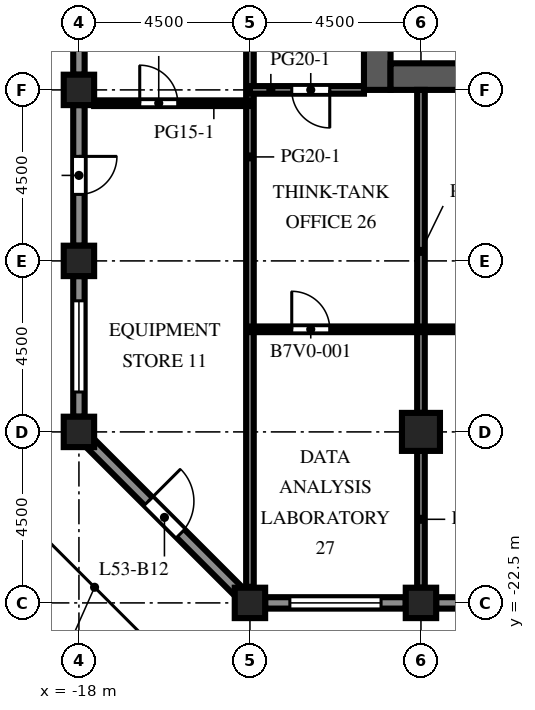
"""IFC4 building model, lengths in metres.
Left out: names, types, materials, properties, quantities, classifications, styles, units other than length and angle.
Written with IfcOpenShell. Run it as: python <this file> out.ifc"""

import sys

from ifc_helpers import new_model, si_unit, direction, frame, frame_2d, origin, origin_2d, place, context, subcontext, project, spatial, rectangle, extrude, element, fill, save


model = new_model("IFC4")
c1 = context("Model", 3, precision=1e-05, world=origin(), true_north=direction((0.0, 1.0)))
c2 = subcontext(c1, "Body", "Model", "MODEL_VIEW")
j1 = project(units=[si_unit("LENGTHUNIT", "METRE"), si_unit("PLANEANGLEUNIT", "RADIAN")], contexts=[c1])
p1 = place(None, origin())
s1 = spatial("IfcSite", under=j1, at=p1, CompositionType="ELEMENT")
p2 = place(p1, origin())
s2 = spatial("IfcBuilding", under=s1, at=p2, CompositionType="ELEMENT")
p3 = place(p2, frame((0.0, 0.0, 235.7)))
s3 = spatial("IfcBuildingStorey", under=s2, at=p3, CompositionType="ELEMENT", Elevation=235.7)
for number, where, z_axis, x_axis in (
    (1, (-18.0, -18.0, 0.0), (0.0, 0.0, 1.0), (1.0, 0.0, 0.0)),
    (2, (-18.0, -13.5, 0.0), (0.0, 0.0, 1.0), (1.0, 0.0, 0.0)),
    (3, (-18.0, -9.0, 0.0), (0.0, 0.0, 1.0), (1.0, 0.0, 0.0)),
    (4, (-13.5, -22.5, 0.0), (0.0, 0.0, 1.0), (1.0, 0.0, 0.0)),
    (5, (-9.0, -22.5, 0.0), (0.0, 0.0, 1.0), (1.0, 0.0, 0.0)),
):
    element("IfcColumn", number, at=place(p3, frame(where, z_axis=z_axis, x_axis=x_axis)), inside=s3, PredefinedType="COLUMN", context=c2, shape_type="SweptSolid", body=[
        extrude(rectangle(XDim=0.8, YDim=0.8, at=origin_2d()), origin(), (0.0, 0.0, 1.0), 4.1),
    ])
p4 = place(p3, frame((-9.0, -18.0, 0.0), z_axis=(0.0, 0.0, 1.0), x_axis=(1.0, 0.0, 0.0)))
e6 = element("IfcColumn", 6, at=p4, inside=s3, PredefinedType="COLUMN", context=c2, shape_type="SweptSolid", body=[
    extrude(rectangle(XDim=1.0, YDim=1.0, at=origin_2d()), origin(), (0.0, 0.0, 1.0), 4.1),
])
p5 = place(p3, frame((-10.15, -9.0, 0.0), z_axis=(0.0, 0.0, 1.0), x_axis=(0.0, 1.0, 0.0)))
e7 = element("IfcWall", 7, at=p5, inside=s3, PredefinedType="SHEAR", context=c2, shape_type="SweptSolid", body=[
    extrude(rectangle(XDim=27.5, YDim=0.7, at=frame_2d((13.75, 0.0))), origin(), (0.0, 0.0, 1.0), 4.1),
])
p6 = place(p5, frame((12.55, 0.0, 0.0)))
e8 = element("IfcOpeningElement", 8, at=p6, cuts=e7, PredefinedType="OPENING", context=c2, shape_type="SweptSolid", body=[
    extrude(rectangle(XDim=2.4, YDim=2.4, at=frame_2d((1.2, 1.2))), frame((0.0, 0.36, 0.0), z_axis=(0.0, -1.0, 0.0), x_axis=(1.0, 0.0, 0.0)), (0.0, 0.0, 1.0), 0.72),
])
p7 = place(p5, frame((6.825, 0.0, 0.0)))
e9 = element("IfcOpeningElement", 9, at=p7, cuts=e7, PredefinedType="OPENING", context=c2, shape_type="SweptSolid", body=[
    extrude(rectangle(XDim=1.2, YDim=2.1, at=frame_2d((0.6, 1.05))), frame((0.0, 0.36, 0.0), z_axis=(0.0, -1.0, 0.0), x_axis=(1.0, 0.0, 0.0)), (0.0, 0.0, 1.0), 0.72),
])
p8 = place(p5, frame((19.475, 0.0, 0.0)))
e10 = element("IfcOpeningElement", 10, at=p8, cuts=e7, PredefinedType="OPENING", context=c2, shape_type="SweptSolid", body=[
    extrude(rectangle(XDim=1.2, YDim=2.1, at=frame_2d((0.6, 1.05))), frame((0.0, 0.36, 0.0), z_axis=(0.0, -1.0, 0.0), x_axis=(1.0, 0.0, 0.0)), (0.0, 0.0, 1.0), 0.72),
])
p9 = place(p3, frame((-9.8, -8.65, 0.0), z_axis=(0.0, 0.0, 1.0), x_axis=(1.0, 0.0, 0.0)))
e11 = element("IfcWall", 11, at=p9, inside=s3, PredefinedType="SHEAR", context=c2, shape_type="SweptSolid", body=[
    extrude(rectangle(XDim=10.6, YDim=0.7, at=frame_2d((5.3, 0.0))), origin(), (0.0, 0.0, 1.0), 4.1),
])
p10 = place(p3, frame((-9.4, -22.5, 0.0), z_axis=(0.0, 0.0, 1.0), x_axis=(-1.0, 0.0, 0.0)))
e12 = element("IfcWall", 12, at=p10, inside=s3, PredefinedType="SOLIDWALL", context=c2, shape_type="SweptSolid", body=[
    extrude(rectangle(XDim=3.7, YDim=0.3, at=frame_2d((1.85, 0.0))), origin(), (0.0, 0.0, 1.0), 2.85),
])
p11 = place(p10, frame((0.65, 0.0, 0.8)))
e13 = element("IfcOpeningElement", 13, at=p11, cuts=e12, PredefinedType="OPENING", context=c2, shape_type="SweptSolid", body=[
    extrude(rectangle(XDim=2.4, YDim=1.7, at=frame_2d((1.2, 0.85))), frame((0.0, 0.16, 0.0), z_axis=(0.0, -1.0, 0.0), x_axis=(1.0, 0.0, 0.0)), (0.0, 0.0, 1.0), 0.32),
])
p12 = place(p3, frame((-4.9, -22.5, 0.0), z_axis=(0.0, 0.0, 1.0), x_axis=(-1.0, 0.0, 0.0)))
e14 = element("IfcWall", 14, at=p12, inside=s3, PredefinedType="SOLIDWALL", context=c2, shape_type="SweptSolid", body=[
    extrude(rectangle(XDim=3.7, YDim=0.3, at=frame_2d((1.85, 0.0))), origin(), (0.0, 0.0, 1.0), 2.85),
])
p13 = place(p12, frame((1.35, 0.0, 0.0)))
e15 = element("IfcOpeningElement", 15, at=p13, cuts=e14, PredefinedType="OPENING", context=c2, shape_type="SweptSolid", body=[
    extrude(rectangle(XDim=1.0, YDim=2.2, at=frame_2d((0.5, 1.1))), frame((0.0, 0.16, 0.0), z_axis=(0.0, -1.0, 0.0), x_axis=(1.0, 0.0, 0.0)), (0.0, 0.0, 1.0), 0.32),
])
p14 = place(p3, frame((-18.0, -8.6, 0.0), z_axis=(0.0, 0.0, 1.0), x_axis=(0.0, 1.0, 0.0)))
e16 = element("IfcWall", 16, at=p14, inside=s3, PredefinedType="SOLIDWALL", context=c2, shape_type="SweptSolid", body=[
    extrude(rectangle(XDim=3.7, YDim=0.3, at=frame_2d((1.85, 0.0))), origin(), (0.0, 0.0, 1.0), 2.85),
])
p15 = place(p14, frame((0.65, 0.0, 0.8)))
e17 = element("IfcOpeningElement", 17, at=p15, cuts=e16, PredefinedType="OPENING", context=c2, shape_type="SweptSolid", body=[
    extrude(rectangle(XDim=2.4, YDim=1.7, at=frame_2d((1.2, 0.85))), frame((0.0, 0.16, 0.0), z_axis=(0.0, -1.0, 0.0), x_axis=(1.0, 0.0, 0.0)), (0.0, 0.0, 1.0), 0.32),
])
p16 = place(p3, frame((-18.0, -13.1, 0.0), z_axis=(0.0, 0.0, 1.0), x_axis=(0.0, 1.0, 0.0)))
e18 = element("IfcWall", 18, at=p16, inside=s3, PredefinedType="SOLIDWALL", context=c2, shape_type="SweptSolid", body=[
    extrude(rectangle(XDim=3.7, YDim=0.3, at=frame_2d((1.85, 0.0))), origin(), (0.0, 0.0, 1.0), 2.85),
])
p17 = place(p16, frame((1.35, 0.0, 0.0)))
e19 = element("IfcOpeningElement", 19, at=p17, cuts=e18, PredefinedType="OPENING", context=c2, shape_type="SweptSolid", body=[
    extrude(rectangle(XDim=1.0, YDim=2.2, at=frame_2d((0.5, 1.1))), frame((0.0, 0.16, 0.0), z_axis=(0.0, -1.0, 0.0), x_axis=(1.0, 0.0, 0.0)), (0.0, 0.0, 1.0), 0.32),
])
p18 = place(p3, frame((-18.0, -17.6, 0.0), z_axis=(0.0, 0.0, 1.0), x_axis=(0.0, 1.0, 0.0)))
e20 = element("IfcWall", 20, at=p18, inside=s3, PredefinedType="SOLIDWALL", context=c2, shape_type="SweptSolid", body=[
    extrude(rectangle(XDim=3.7, YDim=0.3, at=frame_2d((1.85, 0.0))), origin(), (0.0, 0.0, 1.0), 2.85),
])
p19 = place(p18, frame((0.65, 0.0, 0.8)))
e21 = element("IfcOpeningElement", 21, at=p19, cuts=e20, PredefinedType="OPENING", context=c2, shape_type="SweptSolid", body=[
    extrude(rectangle(XDim=2.4, YDim=1.7, at=frame_2d((1.2, 0.85))), frame((0.0, 0.16, 0.0), z_axis=(0.0, -1.0, 0.0), x_axis=(1.0, 0.0, 0.0)), (0.0, 0.0, 1.0), 0.32),
])
p20 = place(p3, frame((-13.794, -22.206, 0.0), z_axis=(0.0, 0.0, 1.0), x_axis=(-0.707106781187, 0.707106781187, 0.0)))
e22 = element("IfcWall", 22, at=p20, inside=s3, PredefinedType="SOLIDWALL", context=c2, shape_type="SweptSolid", body=[
    extrude(rectangle(XDim=5.532, YDim=0.3, at=frame_2d((2.766, 0.0))), origin(), (0.0, 0.0, 1.0), 2.85),
])
p21 = place(p20, frame((2.166, 0.0, 0.0)))
e23 = element("IfcOpeningElement", 23, at=p21, cuts=e22, PredefinedType="OPENING", context=c2, shape_type="SweptSolid", body=[
    extrude(rectangle(XDim=1.2, YDim=2.2, at=frame_2d((0.6, 1.1))), frame((0.0, 0.16, 0.0), z_axis=(0.0, -1.0, 0.0), x_axis=(1.0, 0.0, 0.0)), (0.0, 0.0, 1.0), 0.32),
])
p22 = place(p3, frame((-13.5, -22.077, 0.0), z_axis=(0.0, 0.0, 1.0), x_axis=(0.0, 1.0, 0.0)))
e24 = element("IfcWall", 24, at=p22, inside=s3, PredefinedType="PARTITIONING", context=c2, shape_type="SweptSolid", body=[
    extrude(rectangle(XDim=25.327, YDim=0.2, at=frame_2d((12.664, 0.0))), origin(), (0.0, 0.0, 1.0), 3.65),
])
p23 = place(p22, frame((22.627, 0.0, 0.0)))
e25 = element("IfcOpeningElement", 25, at=p23, cuts=e24, PredefinedType="OPENING", context=c2, shape_type="SweptSolid", body=[
    extrude(rectangle(XDim=1.0, YDim=2.1, at=frame_2d((0.5, 1.05))), frame((0.0, 0.11, 0.0), z_axis=(0.0, -1.0, 0.0), x_axis=(1.0, 0.0, 0.0)), (0.0, 0.0, 1.0), 0.22),
])
p24 = place(p3, frame((-9.0, -22.1, 0.0), z_axis=(0.0, 0.0, 1.0), x_axis=(0.0, 1.0, 0.0)))
e26 = element("IfcWall", 26, at=p24, inside=s3, PredefinedType="PARTITIONING", context=c2, shape_type="SweptSolid", body=[
    extrude(rectangle(XDim=3.6, YDim=0.2, at=frame_2d((1.8, 0.0))), origin(), (0.0, 0.0, 1.0), 3.65),
])
p25 = place(p3, frame((-9.0, -17.5, 0.0), z_axis=(0.0, 0.0, 1.0), x_axis=(0.0, 1.0, 0.0)))
e27 = element("IfcWall", 27, at=p25, inside=s3, PredefinedType="PARTITIONING", context=c2, shape_type="SweptSolid", body=[
    extrude(rectangle(XDim=8.5, YDim=0.2, at=frame_2d((4.25, 0.0))), origin(), (0.0, 0.0, 1.0), 3.65),
])
p26 = place(p3, frame((21.0, -15.3, 0.0), z_axis=(0.0, 0.0, 1.0), x_axis=(-1.0, 0.0, 0.0)))
e28 = element("IfcWall", 28, at=p26, inside=s3, PredefinedType="PARTITIONING", context=c2, shape_type="SweptSolid", body=[
    extrude(rectangle(XDim=34.5, YDim=0.15, at=frame_2d((17.25, 0.0))), origin(), (0.0, 0.0, 1.0), 3.65),
])
p27 = place(p26, frame((32.4, 0.0, 0.0)))
e29 = element("IfcOpeningElement", 29, at=p27, cuts=e28, PredefinedType="OPENING", context=c2, shape_type="SweptSolid", body=[
    extrude(rectangle(XDim=1.0, YDim=2.1, at=frame_2d((0.5, 1.05))), frame((0.0, 0.085, 0.0), z_axis=(0.0, -1.0, 0.0), x_axis=(1.0, 0.0, 0.0)), (0.0, 0.0, 1.0), 0.17),
])
p28 = place(p26, frame((23.4, 0.0, 0.0)))
e30 = element("IfcOpeningElement", 30, at=p28, cuts=e28, PredefinedType="OPENING", context=c2, shape_type="SweptSolid", body=[
    extrude(rectangle(XDim=1.0, YDim=2.1, at=frame_2d((0.5, 1.05))), frame((0.0, 0.085, 0.0), z_axis=(0.0, -1.0, 0.0), x_axis=(1.0, 0.0, 0.0)), (0.0, 0.0, 1.0), 0.17),
])
p29 = place(p26, frame((11.4, 0.0, 0.0)))
e31 = element("IfcOpeningElement", 31, at=p29, cuts=e28, PredefinedType="OPENING", context=c2, shape_type="SweptSolid", body=[
    extrude(rectangle(XDim=1.0, YDim=2.1, at=frame_2d((0.5, 1.05))), frame((0.0, 0.085, 0.0), z_axis=(0.0, -1.0, 0.0), x_axis=(1.0, 0.0, 0.0)), (0.0, 0.0, 1.0), 0.17),
])
p30 = place(p26, frame((2.4, 0.0, 0.0)))
e32 = element("IfcOpeningElement", 32, at=p30, cuts=e28, PredefinedType="OPENING", context=c2, shape_type="SweptSolid", body=[
    extrude(rectangle(XDim=1.0, YDim=2.1, at=frame_2d((0.5, 1.05))), frame((0.0, 0.085, 0.0), z_axis=(0.0, -1.0, 0.0), x_axis=(1.0, 0.0, 0.0)), (0.0, 0.0, 1.0), 0.17),
])
p31 = place(p3, frame((-13.5, -9.35, 0.0), z_axis=(0.0, 0.0, 1.0), x_axis=(-1.0, 0.0, 0.0)))
e33 = element("IfcWall", 33, at=p31, inside=s3, PredefinedType="PARTITIONING", context=c2, shape_type="SweptSolid", body=[
    extrude(rectangle(XDim=4.1, YDim=0.15, at=frame_2d((2.05, 0.0))), origin(), (0.0, 0.0, 1.0), 3.65),
])
p32 = place(p31, frame((1.9, 0.0, 0.0)))
e34 = element("IfcOpeningElement", 34, at=p32, cuts=e33, PredefinedType="OPENING", context=c2, shape_type="SweptSolid", body=[
    extrude(rectangle(XDim=1.0, YDim=2.1, at=frame_2d((0.5, 1.05))), frame((0.0, 0.085, 0.0), z_axis=(0.0, -1.0, 0.0), x_axis=(1.0, 0.0, 0.0)), (0.0, 0.0, 1.0), 0.17),
])
p33 = place(p3, frame((-10.5, -9.0, 0.0), z_axis=(0.0, 0.0, 1.0), x_axis=(-1.0, 0.0, 0.0)))
e35 = element("IfcWall", 35, at=p33, inside=s3, PredefinedType="PARTITIONING", context=c2, shape_type="SweptSolid", body=[
    extrude(rectangle(XDim=3.0, YDim=0.2, at=frame_2d((1.5, 0.0))), origin(), (0.0, 0.0, 1.0), 3.65),
])
p34 = place(p33, frame((0.9, 0.0, 0.0)))
e36 = element("IfcOpeningElement", 36, at=p34, cuts=e35, PredefinedType="OPENING", context=c2, shape_type="SweptSolid", body=[
    extrude(rectangle(XDim=1.0, YDim=2.1, at=frame_2d((0.5, 1.05))), frame((0.0, 0.11, 0.0), z_axis=(0.0, -1.0, 0.0), x_axis=(1.0, 0.0, 0.0)), (0.0, 0.0, 1.0), 0.22),
])
p35 = place(p11, origin())
e37 = element("IfcWindow", 37, at=p35, inside=s3, PartitioningType="SINGLE_PANEL", PredefinedType="WINDOW", context=c2, shape_type="SweptSolid", body=[
    extrude(rectangle(XDim=2.4, YDim=1.7, at=frame_2d((1.2, 0.85))), frame((0.0, 0.03, 0.0), z_axis=(0.0, -1.0, 0.0), x_axis=(1.0, 0.0, 0.0)), (0.0, 0.0, 1.0), 0.06),
])
fill(e13, e37)
p36 = place(p17, origin())
e38 = element("IfcDoor", 38, at=p36, inside=s3, OperationType="SINGLE_SWING_RIGHT", PredefinedType="DOOR", context=c2, shape_type="SweptSolid", body=[
    extrude(rectangle(XDim=1.0, YDim=2.2, at=frame_2d((0.5, 1.1))), frame((0.0, 0.025, 0.0), z_axis=(0.0, -1.0, 0.0), x_axis=(1.0, 0.0, 0.0)), (0.0, 0.0, 1.0), 0.05),
])
fill(e19, e38)
p37 = place(p19, origin())
e39 = element("IfcWindow", 39, at=p37, inside=s3, PartitioningType="SINGLE_PANEL", PredefinedType="WINDOW", context=c2, shape_type="SweptSolid", body=[
    extrude(rectangle(XDim=2.4, YDim=1.7, at=frame_2d((1.2, 0.85))), frame((0.0, 0.03, 0.0), z_axis=(0.0, -1.0, 0.0), x_axis=(1.0, 0.0, 0.0)), (0.0, 0.0, 1.0), 0.06),
])
fill(e21, e39)
p38 = place(p21, origin())
e40 = element("IfcDoor", 40, at=p38, inside=s3, OperationType="SINGLE_SWING_RIGHT", PredefinedType="DOOR", context=c2, shape_type="SweptSolid", body=[
    extrude(rectangle(XDim=1.2, YDim=2.2, at=frame_2d((0.6, 1.1))), frame((0.0, 0.025, 0.0), z_axis=(0.0, -1.0, 0.0), x_axis=(1.0, 0.0, 0.0)), (0.0, 0.0, 1.0), 0.05),
])
fill(e23, e40)
p39 = place(p27, origin())
e41 = element("IfcDoor", 41, at=p39, inside=s3, OperationType="SINGLE_SWING_RIGHT", PredefinedType="DOOR", context=c2, shape_type="SweptSolid", body=[
    extrude(rectangle(XDim=1.0, YDim=2.1, at=frame_2d((0.5, 1.05))), frame((0.0, 0.025, 0.0), z_axis=(0.0, -1.0, 0.0), x_axis=(1.0, 0.0, 0.0)), (0.0, 0.0, 1.0), 0.05),
])
fill(e29, e41)
p40 = place(p32, origin())
e42 = element("IfcDoor", 42, at=p40, inside=s3, OperationType="SINGLE_SWING_RIGHT", PredefinedType="DOOR", context=c2, shape_type="SweptSolid", body=[
    extrude(rectangle(XDim=1.0, YDim=2.1, at=frame_2d((0.5, 1.05))), frame((0.0, 0.025, 0.0), z_axis=(0.0, -1.0, 0.0), x_axis=(1.0, 0.0, 0.0)), (0.0, 0.0, 1.0), 0.05),
])
fill(e34, e42)
p41 = place(p34, origin())
e43 = element("IfcDoor", 43, at=p41, inside=s3, OperationType="SINGLE_SWING_LEFT", PredefinedType="DOOR", context=c2, shape_type="SweptSolid", body=[
    extrude(rectangle(XDim=1.0, YDim=2.1, at=frame_2d((0.5, 1.05))), frame((0.0, 0.025, 0.0), z_axis=(0.0, -1.0, 0.0), x_axis=(1.0, 0.0, 0.0)), (0.0, 0.0, 1.0), 0.05),
])
fill(e36, e43)
save(model, sys.argv[1])
